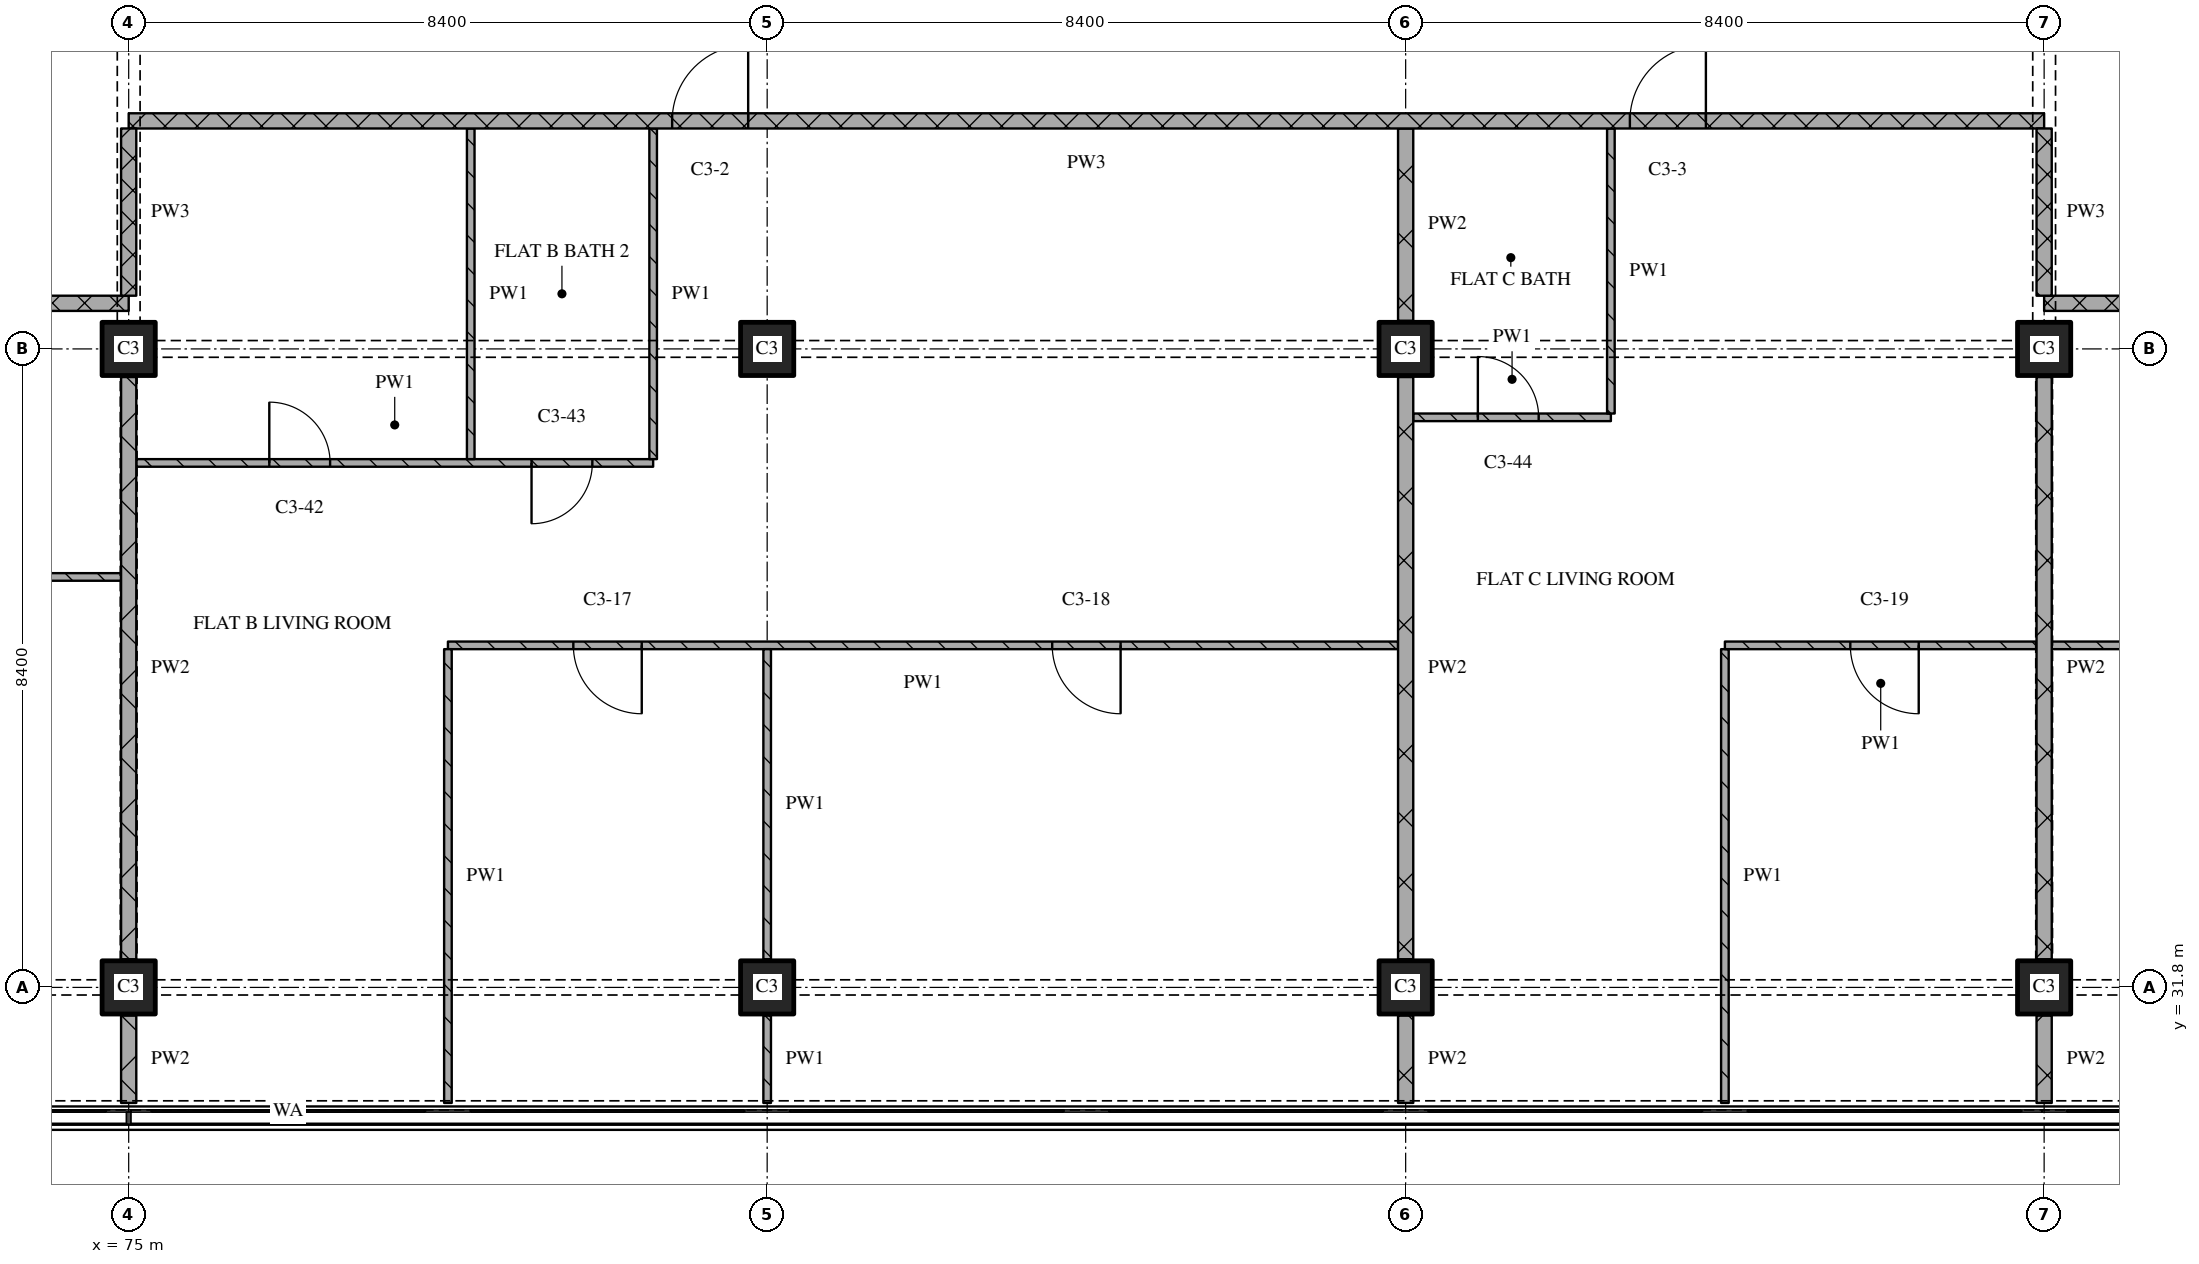
"""IFC4 building model, lengths in metres.
Left out: names, types, materials, properties, quantities, classifications, styles, units other than length and angle.
Written with IfcOpenShell. Run it as: python <this file> out.ifc"""

import sys

from ifc_helpers import new_model, si_unit, direction, frame, frame_2d, origin, origin_2d, place, context, subcontext, project, spatial, rectangle, extrude, element, fill, save


model = new_model("IFC4")
c1 = context("Model", 3, precision=1e-05, world=origin(), true_north=direction((0.0, 1.0)))
c2 = subcontext(c1, "Body", "Model", "MODEL_VIEW")
j1 = project(units=[si_unit("LENGTHUNIT", "METRE"), si_unit("PLANEANGLEUNIT", "RADIAN")], contexts=[c1])
p1 = place(None, origin())
s1 = spatial("IfcSite", under=j1, at=p1, CompositionType="ELEMENT")
p2 = place(p1, origin())
s2 = spatial("IfcBuilding", under=s1, at=p2, CompositionType="ELEMENT")
p3 = place(p2, frame((0.0, 0.0, 176.25)))
s3 = spatial("IfcBuildingStorey", under=s2, at=p3, CompositionType="ELEMENT", Elevation=176.25)
for number, where, z_axis, x_axis in (
    (1, (75.0, 31.8, 0.0), (0.0, 0.0, 1.0), (1.0, 0.0, 0.0)),
    (2, (75.0, 40.2, 0.0), (0.0, 0.0, 1.0), (1.0, 0.0, 0.0)),
    (3, (83.4, 31.8, 0.0), (0.0, 0.0, 1.0), (1.0, 0.0, 0.0)),
    (4, (83.4, 40.2, 0.0), (0.0, 0.0, 1.0), (1.0, 0.0, 0.0)),
    (5, (91.8, 31.8, 0.0), (0.0, 0.0, 1.0), (1.0, 0.0, 0.0)),
    (6, (91.8, 40.2, 0.0), (0.0, 0.0, 1.0), (1.0, 0.0, 0.0)),
    (7, (100.2, 31.8, 0.0), (0.0, 0.0, 1.0), (1.0, 0.0, 0.0)),
    (8, (100.2, 40.2, 0.0), (0.0, 0.0, 1.0), (1.0, 0.0, 0.0)),
):
    element("IfcColumn", number, at=place(p3, frame(where, z_axis=z_axis, x_axis=x_axis)), inside=s3, PredefinedType="COLUMN", context=c2, shape_type="SweptSolid", body=[
        extrude(rectangle(XDim=0.7, YDim=0.7, at=origin_2d()), origin(), (0.0, 0.0, 1.0), 3.6),
    ])
p4 = place(p3, frame((91.7, 36.3, 0.0), z_axis=(0.0, 0.0, 1.0), x_axis=(-1.0, 0.0, 0.0)))
e9 = element("IfcWall", 9, at=p4, inside=s3, PredefinedType="PARTITIONING", context=c2, shape_type="SweptSolid", body=[
    extrude(rectangle(XDim=12.5, YDim=0.1, at=frame_2d((6.25, 0.0))), origin(), (0.0, 0.0, 1.0), 3.32),
])
p5 = place(p4, frame((3.65, 0.0, 0.0)))
e10 = element("IfcOpeningElement", 10, at=p5, cuts=e9, PredefinedType="OPENING", context=c2, shape_type="SweptSolid", body=[
    extrude(rectangle(XDim=0.9, YDim=2.1, at=frame_2d((0.45, 1.05))), frame((0.0, 0.06, 0.0), z_axis=(0.0, -1.0, 0.0), x_axis=(1.0, 0.0, 0.0)), (0.0, 0.0, 1.0), 0.12),
])
p6 = place(p4, frame((9.95, 0.0, 0.0)))
e11 = element("IfcOpeningElement", 11, at=p6, cuts=e9, PredefinedType="OPENING", context=c2, shape_type="SweptSolid", body=[
    extrude(rectangle(XDim=0.9, YDim=2.1, at=frame_2d((0.45, 1.05))), frame((0.0, 0.06, 0.0), z_axis=(0.0, -1.0, 0.0), x_axis=(1.0, 0.0, 0.0)), (0.0, 0.0, 1.0), 0.12),
])
p7 = place(p3, frame((63.0, 37.2, 0.0), z_axis=(0.0, 0.0, 1.0), x_axis=(1.0, 0.0, 0.0)))
e12 = element("IfcWall", 12, at=p7, inside=s3, PredefinedType="PARTITIONING", context=c2, shape_type="SweptSolid", body=[
    extrude(rectangle(XDim=11.9, YDim=0.1, at=frame_2d((5.95, 0.0))), origin(), (0.0, 0.0, 1.0), 3.32),
])
p8 = place(p7, frame((6.35, 0.0, 0.0)))
e13 = element("IfcOpeningElement", 13, at=p8, cuts=e12, PredefinedType="OPENING", context=c2, shape_type="SweptSolid", body=[
    extrude(rectangle(XDim=0.8, YDim=2.1, at=frame_2d((0.4, 1.05))), frame((0.0, 0.06, 0.0), z_axis=(0.0, -1.0, 0.0), x_axis=(1.0, 0.0, 0.0)), (0.0, 0.0, 1.0), 0.12),
])
p9 = place(p7, frame((10.05, 0.0, 0.0)))
e14 = element("IfcOpeningElement", 14, at=p9, cuts=e12, PredefinedType="OPENING", context=c2, shape_type="SweptSolid", body=[
    extrude(rectangle(XDim=0.9, YDim=2.1, at=frame_2d((0.45, 1.05))), frame((0.0, 0.06, 0.0), z_axis=(0.0, -1.0, 0.0), x_axis=(1.0, 0.0, 0.0)), (0.0, 0.0, 1.0), 0.12),
])
p10 = place(p3, frame((75.1, 38.7, 0.0), z_axis=(0.0, 0.0, 1.0), x_axis=(1.0, 0.0, 0.0)))
e15 = element("IfcWall", 15, at=p10, inside=s3, PredefinedType="PARTITIONING", context=c2, shape_type="SweptSolid", body=[
    extrude(rectangle(XDim=6.8, YDim=0.1, at=frame_2d((3.4, 0.0))), origin(), (0.0, 0.0, 1.0), 3.32),
])
p11 = place(p10, frame((1.75, 0.0, 0.0)))
e16 = element("IfcOpeningElement", 16, at=p11, cuts=e15, PredefinedType="OPENING", context=c2, shape_type="SweptSolid", body=[
    extrude(rectangle(XDim=0.8, YDim=2.1, at=frame_2d((0.4, 1.05))), frame((0.0, 0.06, 0.0), z_axis=(0.0, -1.0, 0.0), x_axis=(1.0, 0.0, 0.0)), (0.0, 0.0, 1.0), 0.12),
])
p12 = place(p10, frame((5.2, 0.0, 0.0)))
e17 = element("IfcOpeningElement", 17, at=p12, cuts=e15, PredefinedType="OPENING", context=c2, shape_type="SweptSolid", body=[
    extrude(rectangle(XDim=0.8, YDim=2.1, at=frame_2d((0.4, 1.05))), frame((0.0, 0.06, 0.0), z_axis=(0.0, -1.0, 0.0), x_axis=(1.0, 0.0, 0.0)), (0.0, 0.0, 1.0), 0.12),
])
p13 = place(p3, frame((91.9, 39.3, 0.0), z_axis=(0.0, 0.0, 1.0), x_axis=(1.0, 0.0, 0.0)))
e18 = element("IfcWall", 18, at=p13, inside=s3, PredefinedType="PARTITIONING", context=c2, shape_type="SweptSolid", body=[
    extrude(rectangle(XDim=2.6, YDim=0.1, at=frame_2d((1.3, 0.0))), origin(), (0.0, 0.0, 1.0), 3.32),
])
p14 = place(p13, frame((0.85, 0.0, 0.0)))
e19 = element("IfcOpeningElement", 19, at=p14, cuts=e18, PredefinedType="OPENING", context=c2, shape_type="SweptSolid", body=[
    extrude(rectangle(XDim=0.8, YDim=2.1, at=frame_2d((0.4, 1.05))), frame((0.0, 0.06, 0.0), z_axis=(0.0, -1.0, 0.0), x_axis=(1.0, 0.0, 0.0)), (0.0, 0.0, 1.0), 0.12),
])
p15 = place(p3, frame((75.0, 40.8, 0.0), z_axis=(0.0, 0.0, 1.0), x_axis=(-1.0, 0.0, 0.0)))
e20 = element("IfcWall", 20, at=p15, inside=s3, PredefinedType="PARTITIONING", context=c2, shape_type="SweptSolid", body=[
    extrude(rectangle(XDim=24.28, YDim=0.2, at=frame_2d((12.14, 0.0))), origin(), (0.0, 0.0, 1.0), 3.32),
])
p16 = place(p15, frame((12.25, 0.0, 0.0)))
e21 = element("IfcOpeningElement", 21, at=p16, cuts=e20, PredefinedType="OPENING", context=c2, shape_type="SweptSolid", body=[
    extrude(rectangle(XDim=1.0, YDim=2.1, at=frame_2d((0.5, 1.05))), frame((0.0, 0.11, 0.0), z_axis=(0.0, -1.0, 0.0), x_axis=(1.0, 0.0, 0.0)), (0.0, 0.0, 1.0), 0.22),
])
p17 = place(p3, frame((124.48, 40.8, 0.0), z_axis=(0.0, 0.0, 1.0), x_axis=(-1.0, 0.0, 0.0)))
e22 = element("IfcWall", 22, at=p17, inside=s3, PredefinedType="PARTITIONING", context=c2, shape_type="SweptSolid", body=[
    extrude(rectangle(XDim=24.28, YDim=0.2, at=frame_2d((12.14, 0.0))), origin(), (0.0, 0.0, 1.0), 3.32),
])
p18 = place(p17, frame((11.93, 0.0, 0.0)))
e23 = element("IfcOpeningElement", 23, at=p18, cuts=e22, PredefinedType="OPENING", context=c2, shape_type="SweptSolid", body=[
    extrude(rectangle(XDim=1.0, YDim=2.1, at=frame_2d((0.5, 1.05))), frame((0.0, 0.11, 0.0), z_axis=(0.0, -1.0, 0.0), x_axis=(1.0, 0.0, 0.0)), (0.0, 0.0, 1.0), 0.22),
])
p19 = place(p3, frame((100.2, 43.2, 0.0), z_axis=(0.0, 0.0, 1.0), x_axis=(-1.0, 0.0, 0.0)))
e24 = element("IfcWall", 24, at=p19, inside=s3, PredefinedType="PARTITIONING", context=c2, shape_type="SweptSolid", body=[
    extrude(rectangle(XDim=25.2, YDim=0.2, at=frame_2d((12.6, 0.0))), origin(), (0.0, 0.0, 1.0), 3.32),
])
p20 = place(p19, frame((4.45, 0.0, 0.0)))
e25 = element("IfcOpeningElement", 25, at=p20, cuts=e24, PredefinedType="OPENING", context=c2, shape_type="SweptSolid", body=[
    extrude(rectangle(XDim=1.0, YDim=2.1, at=frame_2d((0.5, 1.05))), frame((0.0, 0.11, 0.0), z_axis=(0.0, -1.0, 0.0), x_axis=(1.0, 0.0, 0.0)), (0.0, 0.0, 1.0), 0.22),
])
p21 = place(p19, frame((17.05, 0.0, 0.0)))
e26 = element("IfcOpeningElement", 26, at=p21, cuts=e24, PredefinedType="OPENING", context=c2, shape_type="SweptSolid", body=[
    extrude(rectangle(XDim=1.0, YDim=2.1, at=frame_2d((0.5, 1.05))), frame((0.0, 0.11, 0.0), z_axis=(0.0, -1.0, 0.0), x_axis=(1.0, 0.0, 0.0)), (0.0, 0.0, 1.0), 0.22),
])
p22 = place(p3, frame((75.0, 43.1, 0.0), z_axis=(0.0, 0.0, 1.0), x_axis=(0.0, -1.0, 0.0)))
e27 = element("IfcWall", 27, at=p22, inside=s3, PredefinedType="PARTITIONING", context=c2, shape_type="SweptSolid", body=[
    extrude(rectangle(XDim=2.2, YDim=0.2, at=frame_2d((1.1, 0.0))), origin(), (0.0, 0.0, 1.0), 2.43),
])
p23 = place(p3, frame((75.0, 31.43, 0.0), z_axis=(0.0, 0.0, 1.0), x_axis=(0.0, -1.0, 0.0)))
e28 = element("IfcWall", 28, at=p23, inside=s3, PredefinedType="PARTITIONING", context=c2, shape_type="SweptSolid", body=[
    extrude(rectangle(XDim=1.15, YDim=0.2, at=frame_2d((0.575, 0.0))), origin(), (0.0, 0.0, 1.0), 3.32),
])
p24 = place(p3, frame((75.0, 39.83, 0.0), z_axis=(0.0, 0.0, 1.0), x_axis=(0.0, -1.0, 0.0)))
e29 = element("IfcWall", 29, at=p24, inside=s3, PredefinedType="PARTITIONING", context=c2, shape_type="SweptSolid", body=[
    extrude(rectangle(XDim=7.66, YDim=0.2, at=frame_2d((3.83, 0.0))), origin(), (0.0, 0.0, 1.0), 2.72),
])
p25 = place(p3, frame((79.2, 36.25, 0.0), z_axis=(0.0, 0.0, 1.0), x_axis=(0.0, -1.0, 0.0)))
e30 = element("IfcWall", 30, at=p25, inside=s3, PredefinedType="PARTITIONING", context=c2, shape_type="SweptSolid", body=[
    extrude(rectangle(XDim=5.97, YDim=0.1, at=frame_2d((2.985, 0.0))), origin(), (0.0, 0.0, 1.0), 3.32),
])
for number, where, z_axis, x_axis in (
    (31, (79.5, 43.1, 0.0), (0.0, 0.0, 1.0), (0.0, -1.0, 0.0)),
    (32, (81.9, 43.1, 0.0), (0.0, 0.0, 1.0), (0.0, -1.0, 0.0)),
):
    element("IfcWall", number, at=place(p3, frame(where, z_axis=z_axis, x_axis=x_axis)), inside=s3, PredefinedType="PARTITIONING", context=c2, shape_type="SweptSolid", body=[
        extrude(rectangle(XDim=4.35, YDim=0.1, at=frame_2d((2.175, 0.0))), origin(), (0.0, 0.0, 1.0), 3.32),
    ])
p26 = place(p3, frame((83.4, 31.43, 0.0), z_axis=(0.0, 0.0, 1.0), x_axis=(0.0, -1.0, 0.0)))
e33 = element("IfcWall", 33, at=p26, inside=s3, PredefinedType="PARTITIONING", context=c2, shape_type="SweptSolid", body=[
    extrude(rectangle(XDim=1.15, YDim=0.1, at=frame_2d((0.575, 0.0))), origin(), (0.0, 0.0, 1.0), 3.32),
])
p27 = place(p3, frame((83.4, 36.25, 0.0), z_axis=(0.0, 0.0, 1.0), x_axis=(0.0, -1.0, 0.0)))
e34 = element("IfcWall", 34, at=p27, inside=s3, PredefinedType="PARTITIONING", context=c2, shape_type="SweptSolid", body=[
    extrude(rectangle(XDim=4.08, YDim=0.1, at=frame_2d((2.04, 0.0))), origin(), (0.0, 0.0, 1.0), 3.32),
])
p28 = place(p3, frame((91.8, 31.43, 0.0), z_axis=(0.0, 0.0, 1.0), x_axis=(0.0, -1.0, 0.0)))
e35 = element("IfcWall", 35, at=p28, inside=s3, PredefinedType="PARTITIONING", context=c2, shape_type="SweptSolid", body=[
    extrude(rectangle(XDim=1.15, YDim=0.2, at=frame_2d((0.575, 0.0))), origin(), (0.0, 0.0, 1.0), 3.32),
])
p29 = place(p3, frame((91.8, 39.83, 0.0), z_axis=(0.0, 0.0, 1.0), x_axis=(0.0, -1.0, 0.0)))
e36 = element("IfcWall", 36, at=p29, inside=s3, PredefinedType="PARTITIONING", context=c2, shape_type="SweptSolid", body=[
    extrude(rectangle(XDim=7.66, YDim=0.2, at=frame_2d((3.83, 0.0))), origin(), (0.0, 0.0, 1.0), 3.32),
])
p30 = place(p3, frame((91.8, 43.1, 0.0), z_axis=(0.0, 0.0, 1.0), x_axis=(0.0, -1.0, 0.0)))
e37 = element("IfcWall", 37, at=p30, inside=s3, PredefinedType="PARTITIONING", context=c2, shape_type="SweptSolid", body=[
    extrude(rectangle(XDim=2.53, YDim=0.2, at=frame_2d((1.265, 0.0))), origin(), (0.0, 0.0, 1.0), 3.32),
])
p31 = place(p3, frame((94.5, 43.1, 0.0), z_axis=(0.0, 0.0, 1.0), x_axis=(0.0, -1.0, 0.0)))
e38 = element("IfcWall", 38, at=p31, inside=s3, PredefinedType="PARTITIONING", context=c2, shape_type="SweptSolid", body=[
    extrude(rectangle(XDim=3.75, YDim=0.1, at=frame_2d((1.875, 0.0))), origin(), (0.0, 0.0, 1.0), 3.32),
])
p32 = place(p3, frame((96.0, 36.25, 0.0), z_axis=(0.0, 0.0, 1.0), x_axis=(0.0, -1.0, 0.0)))
e39 = element("IfcWall", 39, at=p32, inside=s3, PredefinedType="PARTITIONING", context=c2, shape_type="SweptSolid", body=[
    extrude(rectangle(XDim=5.97, YDim=0.1, at=frame_2d((2.985, 0.0))), origin(), (0.0, 0.0, 1.0), 3.32),
])
p33 = place(p3, frame((100.2, 43.1, 0.0), z_axis=(0.0, 0.0, 1.0), x_axis=(0.0, -1.0, 0.0)))
e40 = element("IfcWall", 40, at=p33, inside=s3, PredefinedType="PARTITIONING", context=c2, shape_type="SweptSolid", body=[
    extrude(rectangle(XDim=2.2, YDim=0.2, at=frame_2d((1.1, 0.0))), origin(), (0.0, 0.0, 1.0), 2.43),
])
p34 = place(p3, frame((100.2, 31.43, 0.0), z_axis=(0.0, 0.0, 1.0), x_axis=(0.0, -1.0, 0.0)))
e41 = element("IfcWall", 41, at=p34, inside=s3, PredefinedType="PARTITIONING", context=c2, shape_type="SweptSolid", body=[
    extrude(rectangle(XDim=1.15, YDim=0.2, at=frame_2d((0.575, 0.0))), origin(), (0.0, 0.0, 1.0), 3.32),
])
p35 = place(p3, frame((100.2, 39.83, 0.0), z_axis=(0.0, 0.0, 1.0), x_axis=(0.0, -1.0, 0.0)))
e42 = element("IfcWall", 42, at=p35, inside=s3, PredefinedType="PARTITIONING", context=c2, shape_type="SweptSolid", body=[
    extrude(rectangle(XDim=7.66, YDim=0.2, at=frame_2d((3.83, 0.0))), origin(), (0.0, 0.0, 1.0), 2.72),
])
p36 = place(p3, frame((100.1, 36.3, 0.0), z_axis=(0.0, 0.0, 1.0), x_axis=(-1.0, 0.0, 0.0)))
e43 = element("IfcWall", 43, at=p36, inside=s3, PredefinedType="PARTITIONING", context=c2, shape_type="SweptSolid", body=[
    extrude(rectangle(XDim=4.1, YDim=0.1, at=frame_2d((2.05, 0.0))), origin(), (0.0, 0.0, 1.0), 3.32),
])
p37 = place(p36, frame((1.55, 0.0, 0.0)))
e44 = element("IfcOpeningElement", 44, at=p37, cuts=e43, PredefinedType="OPENING", context=c2, shape_type="SweptSolid", body=[
    extrude(rectangle(XDim=0.9, YDim=2.1, at=frame_2d((0.45, 1.05))), frame((0.0, 0.06, 0.0), z_axis=(0.0, -1.0, 0.0), x_axis=(1.0, 0.0, 0.0)), (0.0, 0.0, 1.0), 0.12),
])
p38 = place(p3, frame((100.3, 36.3, 0.0), z_axis=(0.0, 0.0, 1.0), x_axis=(1.0, 0.0, 0.0)))
e45 = element("IfcWall", 45, at=p38, inside=s3, PredefinedType="PARTITIONING", context=c2, shape_type="SweptSolid", body=[
    extrude(rectangle(XDim=11.0, YDim=0.1, at=frame_2d((5.5, 0.0))), origin(), (0.0, 0.0, 1.0), 3.32),
])
p39 = place(p38, frame((1.75, 0.0, 0.0)))
e46 = element("IfcOpeningElement", 46, at=p39, cuts=e45, PredefinedType="OPENING", context=c2, shape_type="SweptSolid", body=[
    extrude(rectangle(XDim=0.8, YDim=2.1, at=frame_2d((0.4, 1.05))), frame((0.0, 0.06, 0.0), z_axis=(0.0, -1.0, 0.0), x_axis=(1.0, 0.0, 0.0)), (0.0, 0.0, 1.0), 0.12),
])
p40 = place(p38, frame((6.25, 0.0, 0.0)))
e47 = element("IfcOpeningElement", 47, at=p40, cuts=e45, PredefinedType="OPENING", context=c2, shape_type="SweptSolid", body=[
    extrude(rectangle(XDim=0.8, YDim=2.1, at=frame_2d((0.4, 1.05))), frame((0.0, 0.06, 0.0), z_axis=(0.0, -1.0, 0.0), x_axis=(1.0, 0.0, 0.0)), (0.0, 0.0, 1.0), 0.12),
])
p41 = place(p38, frame((9.5, 0.0, 0.0)))
e48 = element("IfcOpeningElement", 48, at=p41, cuts=e45, PredefinedType="OPENING", context=c2, shape_type="SweptSolid", body=[
    extrude(rectangle(XDim=0.9, YDim=2.1, at=frame_2d((0.45, 1.05))), frame((0.0, 0.06, 0.0), z_axis=(0.0, -1.0, 0.0), x_axis=(1.0, 0.0, 0.0)), (0.0, 0.0, 1.0), 0.12),
])
p42 = place(p5, origin())
e49 = element("IfcDoor", 49, at=p42, inside=s3, OperationType="SINGLE_SWING_LEFT", PredefinedType="DOOR", context=c2, shape_type="SweptSolid", body=[
    extrude(rectangle(XDim=0.9, YDim=2.1, at=frame_2d((0.45, 1.05))), frame((0.0, 0.025, 0.0), z_axis=(0.0, -1.0, 0.0), x_axis=(1.0, 0.0, 0.0)), (0.0, 0.0, 1.0), 0.05),
])
fill(e10, e49)
p43 = place(p6, origin())
e50 = element("IfcDoor", 50, at=p43, inside=s3, OperationType="SINGLE_SWING_LEFT", PredefinedType="DOOR", context=c2, shape_type="SweptSolid", body=[
    extrude(rectangle(XDim=0.9, YDim=2.1, at=frame_2d((0.45, 1.05))), frame((0.0, 0.025, 0.0), z_axis=(0.0, -1.0, 0.0), x_axis=(1.0, 0.0, 0.0)), (0.0, 0.0, 1.0), 0.05),
])
fill(e11, e50)
p44 = place(p11, origin())
e51 = element("IfcDoor", 51, at=p44, inside=s3, OperationType="SINGLE_SWING_LEFT", PredefinedType="DOOR", context=c2, shape_type="SweptSolid", body=[
    extrude(rectangle(XDim=0.8, YDim=2.1, at=frame_2d((0.4, 1.05))), frame((0.0, 0.025, 0.0), z_axis=(0.0, -1.0, 0.0), x_axis=(1.0, 0.0, 0.0)), (0.0, 0.0, 1.0), 0.05),
])
fill(e16, e51)
p45 = place(p12, origin())
e52 = element("IfcDoor", 52, at=p45, inside=s3, OperationType="SINGLE_SWING_RIGHT", PredefinedType="DOOR", context=c2, shape_type="SweptSolid", body=[
    extrude(rectangle(XDim=0.8, YDim=2.1, at=frame_2d((0.4, 1.05))), frame((0.0, 0.025, 0.0), z_axis=(0.0, -1.0, 0.0), x_axis=(1.0, 0.0, 0.0)), (0.0, 0.0, 1.0), 0.05),
])
fill(e17, e52)
p46 = place(p14, origin())
e53 = element("IfcDoor", 53, at=p46, inside=s3, OperationType="SINGLE_SWING_LEFT", PredefinedType="DOOR", context=c2, shape_type="SweptSolid", body=[
    extrude(rectangle(XDim=0.8, YDim=2.1, at=frame_2d((0.4, 1.05))), frame((0.0, 0.025, 0.0), z_axis=(0.0, -1.0, 0.0), x_axis=(1.0, 0.0, 0.0)), (0.0, 0.0, 1.0), 0.05),
])
fill(e19, e53)
p47 = place(p20, origin())
e54 = element("IfcDoor", 54, at=p47, inside=s3, OperationType="SINGLE_SWING_RIGHT", PredefinedType="DOOR", context=c2, shape_type="SweptSolid", body=[
    extrude(rectangle(XDim=1.0, YDim=2.1, at=frame_2d((0.5, 1.05))), frame((0.0, 0.025, 0.0), z_axis=(0.0, -1.0, 0.0), x_axis=(1.0, 0.0, 0.0)), (0.0, 0.0, 1.0), 0.05),
])
fill(e25, e54)
p48 = place(p21, origin())
e55 = element("IfcDoor", 55, at=p48, inside=s3, OperationType="SINGLE_SWING_RIGHT", PredefinedType="DOOR", context=c2, shape_type="SweptSolid", body=[
    extrude(rectangle(XDim=1.0, YDim=2.1, at=frame_2d((0.5, 1.05))), frame((0.0, 0.025, 0.0), z_axis=(0.0, -1.0, 0.0), x_axis=(1.0, 0.0, 0.0)), (0.0, 0.0, 1.0), 0.05),
])
fill(e26, e55)
p49 = place(p37, origin())
e56 = element("IfcDoor", 56, at=p49, inside=s3, OperationType="SINGLE_SWING_LEFT", PredefinedType="DOOR", context=c2, shape_type="SweptSolid", body=[
    extrude(rectangle(XDim=0.9, YDim=2.1, at=frame_2d((0.45, 1.05))), frame((0.0, 0.025, 0.0), z_axis=(0.0, -1.0, 0.0), x_axis=(1.0, 0.0, 0.0)), (0.0, 0.0, 1.0), 0.05),
])
fill(e44, e56)
save(model, sys.argv[1])
